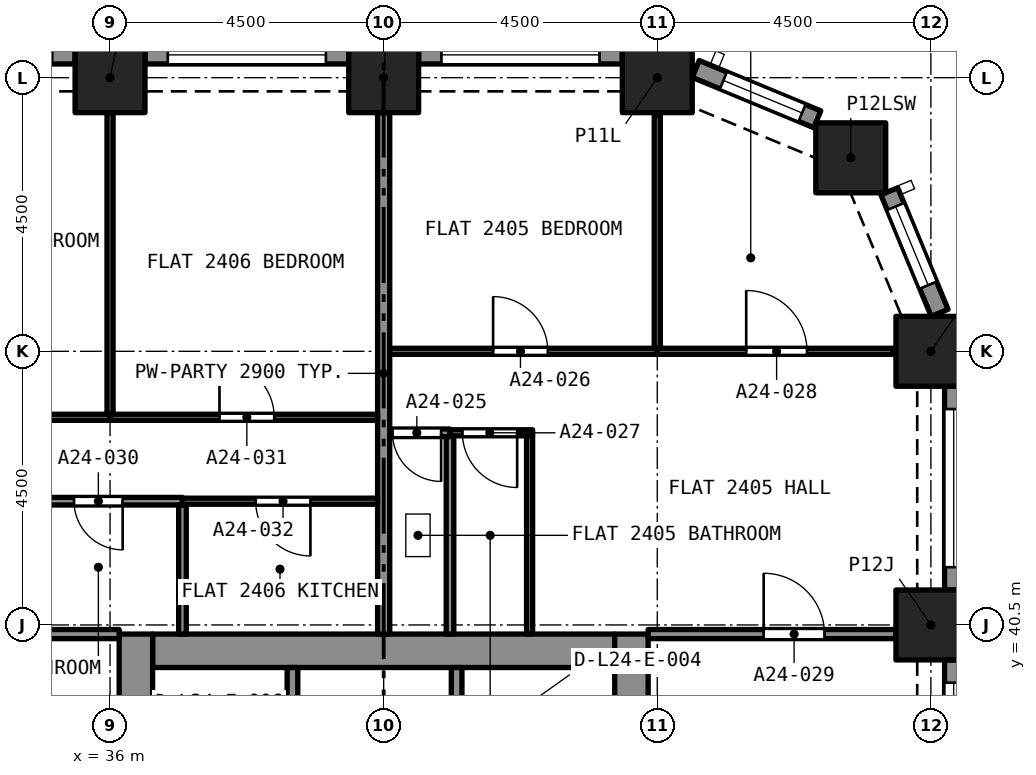
"""IFC4 building model, lengths in metres.
Left out: names, types, materials, properties, quantities, classifications, styles, units other than length and angle.
Written with IfcOpenShell. Run it as: python <this file> out.ifc"""

import sys

from ifc_helpers import new_model, si_unit, direction, frame, frame_2d, origin, origin_2d, place, context, subcontext, project, spatial, rectangle, extrude, element, fill, save


model = new_model("IFC4")
c1 = context("Model", 3, precision=1e-05, world=origin(), true_north=direction((0.0, 1.0)))
c2 = subcontext(c1, "Body", "Model", "MODEL_VIEW")
j1 = project(units=[si_unit("LENGTHUNIT", "METRE"), si_unit("PLANEANGLEUNIT", "RADIAN")], contexts=[c1])
p1 = place(None, origin())
s1 = spatial("IfcSite", under=j1, at=p1, CompositionType="ELEMENT")
p2 = place(p1, origin())
s2 = spatial("IfcBuilding", under=s1, at=p2, CompositionType="ELEMENT")
p3 = place(p2, frame((0.0, 0.0, 89.6)))
s3 = spatial("IfcBuildingStorey", under=s2, at=p3, CompositionType="ELEMENT", Elevation=89.6)
for number, where, z_axis, x_axis in (
    (1, (49.5, 40.5, 0.0), (0.0, 0.0, 1.0), (1.0, 0.0, 0.0)),
    (2, (49.5, 45.0, 0.0), (0.0, 0.0, 1.0), (1.0, 0.0, 0.0)),
    (3, (48.182, 48.182, 0.0), (0.0, 0.0, 1.0), (1.0, 0.0, 0.0)),
    (4, (36.0, 49.5, 0.0), (0.0, 0.0, 1.0), (1.0, 0.0, 0.0)),
    (5, (40.5, 49.5, 0.0), (0.0, 0.0, 1.0), (1.0, 0.0, 0.0)),
    (6, (45.0, 49.5, 0.0), (0.0, 0.0, 1.0), (1.0, 0.0, 0.0)),
):
    element("IfcColumn", number, at=place(p3, frame(where, z_axis=z_axis, x_axis=x_axis)), inside=s3, PredefinedType="COLUMN", context=c2, shape_type="SweptSolid", body=[
        extrude(rectangle(XDim=1.15, YDim=1.15, at=origin_2d()), origin(), (0.0, 0.0, 1.0), 3.2),
    ])
p4 = place(p3, frame((36.7, 40.075, 0.0), z_axis=(0.0, 0.0, 1.0), x_axis=(1.0, 0.0, 0.0)))
e7 = element("IfcWall", 7, at=p4, inside=s3, PredefinedType="SOLIDWALL", context=c2, shape_type="SweptSolid", body=[
    extrude(rectangle(XDim=7.6, YDim=0.55, at=frame_2d((3.8, 0.0))), origin(), (0.0, 0.0, 1.0), 3.2),
])
p5 = place(p3, frame((36.425, 27.15, 0.0), z_axis=(0.0, 0.0, 1.0), x_axis=(0.0, 1.0, 0.0)))
e8 = element("IfcWall", 8, at=p5, inside=s3, PredefinedType="SOLIDWALL", context=c2, shape_type="SweptSolid", body=[
    extrude(rectangle(XDim=13.2, YDim=0.55, at=frame_2d((6.6, 0.0))), origin(), (0.0, 0.0, 1.0), 3.2),
])
p6 = place(p5, frame((8.8, 0.0, 0.0)))
e9 = element("IfcOpeningElement", 9, at=p6, cuts=e8, PredefinedType="OPENING", context=c2, shape_type="SweptSolid", body=[
    extrude(rectangle(XDim=1.2, YDim=2.1, at=frame_2d((0.6, 1.05))), frame((0.0, 0.285, 0.0), z_axis=(0.0, -1.0, 0.0), x_axis=(1.0, 0.0, 0.0)), (0.0, 0.0, 1.0), 0.57),
])
p7 = place(p3, frame((44.575, 27.15, 0.0), z_axis=(0.0, 0.0, 1.0), x_axis=(0.0, 1.0, 0.0)))
e10 = element("IfcWall", 10, at=p7, inside=s3, PredefinedType="SOLIDWALL", context=c2, shape_type="SweptSolid", body=[
    extrude(rectangle(XDim=13.2, YDim=0.55, at=frame_2d((6.6, 0.0))), origin(), (0.0, 0.0, 1.0), 3.2),
])
p8 = place(p7, frame((8.8, 0.0, 0.0)))
e11 = element("IfcOpeningElement", 11, at=p8, cuts=e10, PredefinedType="OPENING", context=c2, shape_type="SweptSolid", body=[
    extrude(rectangle(XDim=1.2, YDim=2.1, at=frame_2d((0.6, 1.05))), frame((0.0, 0.285, 0.0), z_axis=(0.0, -1.0, 0.0), x_axis=(1.0, 0.0, 0.0)), (0.0, 0.0, 1.0), 0.57),
])
p9 = place(p3, frame((49.875, 39.925, 0.0), z_axis=(0.0, 0.0, 1.0), x_axis=(0.0, -1.0, 0.0)))
e12 = element("IfcWall", 12, at=p9, inside=s3, PredefinedType="SOLIDWALL", context=c2, shape_type="SweptSolid", body=[
    extrude(rectangle(XDim=3.35, YDim=0.3, at=frame_2d((1.675, 0.0))), origin(), (0.0, 0.0, 1.0), 3.2),
])
p10 = place(p9, frame((0.375, 0.0, 0.45)))
e13 = element("IfcOpeningElement", 13, at=p10, cuts=e12, PredefinedType="OPENING", context=c2, shape_type="SweptSolid", body=[
    extrude(rectangle(XDim=2.6, YDim=1.95, at=frame_2d((1.3, 0.975))), frame((0.0, 0.16, 0.0), z_axis=(0.0, -1.0, 0.0), x_axis=(1.0, 0.0, 0.0)), (0.0, 0.0, 1.0), 0.32),
])
p11 = place(p3, frame((49.875, 44.425, 0.0), z_axis=(0.0, 0.0, 1.0), x_axis=(0.0, -1.0, 0.0)))
e14 = element("IfcWall", 14, at=p11, inside=s3, PredefinedType="SOLIDWALL", context=c2, shape_type="SweptSolid", body=[
    extrude(rectangle(XDim=3.35, YDim=0.3, at=frame_2d((1.675, 0.0))), origin(), (0.0, 0.0, 1.0), 3.2),
])
p12 = place(p11, frame((0.375, 0.0, 0.45)))
e15 = element("IfcOpeningElement", 15, at=p12, cuts=e14, PredefinedType="OPENING", context=c2, shape_type="SweptSolid", body=[
    extrude(rectangle(XDim=2.6, YDim=1.95, at=frame_2d((1.3, 0.975))), frame((0.0, 0.16, 0.0), z_axis=(0.0, -1.0, 0.0), x_axis=(1.0, 0.0, 0.0)), (0.0, 0.0, 1.0), 0.32),
])
p13 = place(p3, frame((48.816, 47.631, 0.0), z_axis=(0.0, 0.0, 1.0), x_axis=(0.382723818695, -0.923862802911, 0.0)))
e16 = element("IfcWall", 16, at=p13, inside=s3, PredefinedType="SOLIDWALL", context=c2, shape_type="SweptSolid", body=[
    extrude(rectangle(XDim=2.164, YDim=0.3, at=frame_2d((1.082, 0.0))), origin(), (0.0, 0.0, 1.0), 3.2),
])
p14 = place(p13, frame((0.271, 0.0, 0.45)))
e17 = element("IfcOpeningElement", 17, at=p14, cuts=e16, PredefinedType="OPENING", context=c2, shape_type="SweptSolid", body=[
    extrude(rectangle(XDim=1.4, YDim=1.95, at=frame_2d((0.7, 0.975))), frame((0.0, 0.16, 0.0), z_axis=(0.0, -1.0, 0.0), x_axis=(1.0, 0.0, 0.0)), (0.0, 0.0, 1.0), 0.32),
])
p15 = place(p3, frame((45.632, 49.644, 0.0), z_axis=(0.0, 0.0, 1.0), x_axis=(0.923862802911, -0.382723818695, 0.0)))
e18 = element("IfcWall", 18, at=p15, inside=s3, PredefinedType="SOLIDWALL", context=c2, shape_type="SweptSolid", body=[
    extrude(rectangle(XDim=2.164, YDim=0.3, at=frame_2d((1.082, 0.0))), origin(), (0.0, 0.0, 1.0), 3.2),
])
p16 = place(p15, frame((0.493, 0.0, 0.45)))
e19 = element("IfcOpeningElement", 19, at=p16, cuts=e18, PredefinedType="OPENING", context=c2, shape_type="SweptSolid", body=[
    extrude(rectangle(XDim=1.4, YDim=1.95, at=frame_2d((0.7, 0.975))), frame((0.0, 0.16, 0.0), z_axis=(0.0, -1.0, 0.0), x_axis=(1.0, 0.0, 0.0)), (0.0, 0.0, 1.0), 0.32),
])
p17 = place(p3, frame((41.075, 49.875, 0.0), z_axis=(0.0, 0.0, 1.0), x_axis=(1.0, 0.0, 0.0)))
e20 = element("IfcWall", 20, at=p17, inside=s3, PredefinedType="SOLIDWALL", context=c2, shape_type="SweptSolid", body=[
    extrude(rectangle(XDim=3.35, YDim=0.3, at=frame_2d((1.675, 0.0))), origin(), (0.0, 0.0, 1.0), 3.2),
])
p18 = place(p17, frame((0.375, 0.0, 0.45)))
e21 = element("IfcOpeningElement", 21, at=p18, cuts=e20, PredefinedType="OPENING", context=c2, shape_type="SweptSolid", body=[
    extrude(rectangle(XDim=2.6, YDim=1.95, at=frame_2d((1.3, 0.975))), frame((0.0, 0.16, 0.0), z_axis=(0.0, -1.0, 0.0), x_axis=(1.0, 0.0, 0.0)), (0.0, 0.0, 1.0), 0.32),
])
p19 = place(p3, frame((36.575, 49.875, 0.0), z_axis=(0.0, 0.0, 1.0), x_axis=(1.0, 0.0, 0.0)))
e22 = element("IfcWall", 22, at=p19, inside=s3, PredefinedType="SOLIDWALL", context=c2, shape_type="SweptSolid", body=[
    extrude(rectangle(XDim=3.35, YDim=0.3, at=frame_2d((1.675, 0.0))), origin(), (0.0, 0.0, 1.0), 3.2),
])
p20 = place(p19, frame((0.375, 0.0, 0.45)))
e23 = element("IfcOpeningElement", 23, at=p20, cuts=e22, PredefinedType="OPENING", context=c2, shape_type="SweptSolid", body=[
    extrude(rectangle(XDim=2.6, YDim=1.95, at=frame_2d((1.3, 0.975))), frame((0.0, 0.16, 0.0), z_axis=(0.0, -1.0, 0.0), x_axis=(1.0, 0.0, 0.0)), (0.0, 0.0, 1.0), 0.32),
])
p21 = place(p3, frame((32.075, 49.875, 0.0), z_axis=(0.0, 0.0, 1.0), x_axis=(1.0, 0.0, 0.0)))
e24 = element("IfcWall", 24, at=p21, inside=s3, PredefinedType="SOLIDWALL", context=c2, shape_type="SweptSolid", body=[
    extrude(rectangle(XDim=3.35, YDim=0.3, at=frame_2d((1.675, 0.0))), origin(), (0.0, 0.0, 1.0), 3.2),
])
p22 = place(p21, frame((0.375, 0.0, 0.45)))
e25 = element("IfcOpeningElement", 25, at=p22, cuts=e24, PredefinedType="OPENING", context=c2, shape_type="SweptSolid", body=[
    extrude(rectangle(XDim=2.6, YDim=1.95, at=frame_2d((1.3, 0.975))), frame((0.0, 0.16, 0.0), z_axis=(0.0, -1.0, 0.0), x_axis=(1.0, 0.0, 0.0)), (0.0, 0.0, 1.0), 0.32),
])
p23 = place(p3, frame((41.591, 43.66, 0.0), z_axis=(0.0, 0.0, 1.0), x_axis=(-1.0, 0.0, 0.0)))
e26 = element("IfcWall", 26, at=p23, inside=s3, PredefinedType="PARTITIONING", context=c2, shape_type="SweptSolid", body=[
    extrude(rectangle(XDim=0.991, YDim=0.125, at=frame_2d((0.495, 0.0))), origin(), (0.0, 0.0, 1.0), 2.9),
])
p24 = place(p23, frame((0.146, 0.0, 0.0)))
e27 = element("IfcOpeningElement", 27, at=p24, cuts=e26, PredefinedType="OPENING", context=c2, shape_type="SweptSolid", body=[
    extrude(rectangle(XDim=0.8, YDim=2.1, at=frame_2d((0.4, 1.05))), frame((0.0, 0.073, 0.0), z_axis=(0.0, -1.0, 0.0), x_axis=(1.0, 0.0, 0.0)), (0.0, 0.0, 1.0), 0.145),
])
p25 = place(p3, frame((41.591, 40.35, 0.0), z_axis=(0.0, 0.0, 1.0), x_axis=(0.0, 1.0, 0.0)))
e28 = element("IfcWall", 28, at=p25, inside=s3, PredefinedType="PARTITIONING", context=c2, shape_type="SweptSolid", body=[
    extrude(rectangle(XDim=3.247, YDim=0.125, at=frame_2d((1.624, 0.0))), origin(), (0.0, 0.0, 1.0), 2.9),
])
p26 = place(p3, frame((40.5, 40.35, 0.0), z_axis=(0.0, 0.0, 1.0), x_axis=(0.0, 1.0, 0.0)))
e29 = element("IfcWall", 29, at=p26, inside=s3, PredefinedType="PARTITIONING", context=c2, shape_type="SweptSolid", body=[
    extrude(rectangle(XDim=8.575, YDim=0.2, at=frame_2d((4.288, 0.0))), origin(), (0.0, 0.0, 1.0), 2.9),
])
p27 = place(p3, frame((40.6, 45.0, 0.0), z_axis=(0.0, 0.0, 1.0), x_axis=(1.0, 0.0, 0.0)))
e30 = element("IfcWall", 30, at=p27, inside=s3, PredefinedType="PARTITIONING", context=c2, shape_type="SweptSolid", body=[
    extrude(rectangle(XDim=4.4, YDim=0.1, at=frame_2d((2.2, 0.0))), origin(), (0.0, 0.0, 1.0), 2.9),
])
p28 = place(p27, frame((1.7, 0.0, 0.0)))
e31 = element("IfcOpeningElement", 31, at=p28, cuts=e30, PredefinedType="OPENING", context=c2, shape_type="SweptSolid", body=[
    extrude(rectangle(XDim=0.9, YDim=2.1, at=frame_2d((0.45, 1.05))), frame((0.0, 0.06, 0.0), z_axis=(0.0, -1.0, 0.0), x_axis=(1.0, 0.0, 0.0)), (0.0, 0.0, 1.0), 0.12),
])
p29 = place(p3, frame((45.0, 45.05, 0.0), z_axis=(0.0, 0.0, 1.0), x_axis=(0.0, 1.0, 0.0)))
e32 = element("IfcWall", 32, at=p29, inside=s3, PredefinedType="PARTITIONING", context=c2, shape_type="SweptSolid", body=[
    extrude(rectangle(XDim=3.828, YDim=0.1, at=frame_2d((1.914, 0.0))), origin(), (0.0, 0.0, 1.0), 2.9),
])
p30 = place(p3, frame((42.9, 40.35, 0.0), z_axis=(0.0, 0.0, 1.0), x_axis=(0.0, 1.0, 0.0)))
e33 = element("IfcWall", 33, at=p30, inside=s3, PredefinedType="PARTITIONING", context=c2, shape_type="SweptSolid", body=[
    extrude(rectangle(XDim=3.26, YDim=0.1, at=frame_2d((1.63, 0.0))), origin(), (0.0, 0.0, 1.0), 2.9),
])
p31 = place(p3, frame((42.95, 43.66, 0.0), z_axis=(0.0, 0.0, 1.0), x_axis=(-1.0, 0.0, 0.0)))
e34 = element("IfcWall", 34, at=p31, inside=s3, PredefinedType="PARTITIONING", context=c2, shape_type="SweptSolid", body=[
    extrude(rectangle(XDim=1.359, YDim=0.1, at=frame_2d((0.68, 0.0))), origin(), (0.0, 0.0, 1.0), 2.9),
])
p32 = place(p31, frame((0.254, 0.0, 0.0)))
e35 = element("IfcOpeningElement", 35, at=p32, cuts=e34, PredefinedType="OPENING", context=c2, shape_type="SweptSolid", body=[
    extrude(rectangle(XDim=0.9, YDim=2.1, at=frame_2d((0.45, 1.05))), frame((0.0, 0.06, 0.0), z_axis=(0.0, -1.0, 0.0), x_axis=(1.0, 0.0, 0.0)), (0.0, 0.0, 1.0), 0.12),
])
p33 = place(p3, frame((45.0, 45.0, 0.0), z_axis=(0.0, 0.0, 1.0), x_axis=(1.0, 0.0, 0.0)))
e36 = element("IfcWall", 36, at=p33, inside=s3, PredefinedType="PARTITIONING", context=c2, shape_type="SweptSolid", body=[
    extrude(rectangle(XDim=3.878, YDim=0.1, at=frame_2d((1.939, 0.0))), origin(), (0.0, 0.0, 1.0), 2.9),
])
p34 = place(p33, frame((1.462, 0.0, 0.0)))
e37 = element("IfcOpeningElement", 37, at=p34, cuts=e36, PredefinedType="OPENING", context=c2, shape_type="SweptSolid", body=[
    extrude(rectangle(XDim=1.0, YDim=2.1, at=frame_2d((0.5, 1.05))), frame((0.0, 0.06, 0.0), z_axis=(0.0, -1.0, 0.0), x_axis=(1.0, 0.0, 0.0)), (0.0, 0.0, 1.0), 0.12),
])
p35 = place(p3, frame((44.85, 40.35, 0.0), z_axis=(0.0, 0.0, 1.0), x_axis=(1.0, 0.0, 0.0)))
e38 = element("IfcWall", 38, at=p35, inside=s3, PredefinedType="PARTITIONING", context=c2, shape_type="SweptSolid", body=[
    extrude(rectangle(XDim=4.075, YDim=0.15, at=frame_2d((2.038, 0.0))), origin(), (0.0, 0.0, 1.0), 2.9),
])
p36 = place(p35, frame((1.9, 0.0, 0.0)))
e39 = element("IfcOpeningElement", 39, at=p36, cuts=e38, PredefinedType="OPENING", context=c2, shape_type="SweptSolid", body=[
    extrude(rectangle(XDim=1.0, YDim=2.1, at=frame_2d((0.5, 1.05))), frame((0.0, 0.085, 0.0), z_axis=(0.0, -1.0, 0.0), x_axis=(1.0, 0.0, 0.0)), (0.0, 0.0, 1.0), 0.17),
])
p37 = place(p3, frame((37.19, 42.535, 0.0), z_axis=(0.0, 0.0, 1.0), x_axis=(-1.0, 0.0, 0.0)))
e40 = element("IfcWall", 40, at=p37, inside=s3, PredefinedType="PARTITIONING", context=c2, shape_type="SweptSolid", body=[
    extrude(rectangle(XDim=2.828, YDim=0.125, at=frame_2d((1.414, 0.0))), origin(), (0.0, 0.0, 1.0), 2.9),
])
p38 = place(p37, frame((0.983, 0.0, 0.0)))
e41 = element("IfcOpeningElement", 41, at=p38, cuts=e40, PredefinedType="OPENING", context=c2, shape_type="SweptSolid", body=[
    extrude(rectangle(XDim=0.8, YDim=2.1, at=frame_2d((0.4, 1.05))), frame((0.0, 0.073, 0.0), z_axis=(0.0, -1.0, 0.0), x_axis=(1.0, 0.0, 0.0)), (0.0, 0.0, 1.0), 0.145),
])
p39 = place(p3, frame((37.191, 40.35, 0.0), z_axis=(0.0, 0.0, 1.0), x_axis=(0.0, 1.0, 0.0)))
e42 = element("IfcWall", 42, at=p39, inside=s3, PredefinedType="PARTITIONING", context=c2, shape_type="SweptSolid", body=[
    extrude(rectangle(XDim=2.122, YDim=0.125, at=frame_2d((1.061, 0.0))), origin(), (0.0, 0.0, 1.0), 2.9),
])
p40 = place(p3, frame((34.425, 40.35, 0.0), z_axis=(0.0, 0.0, 1.0), x_axis=(1.0, 0.0, 0.0)))
e43 = element("IfcWall", 43, at=p40, inside=s3, PredefinedType="PARTITIONING", context=c2, shape_type="SweptSolid", body=[
    extrude(rectangle(XDim=1.725, YDim=0.15, at=frame_2d((0.862, 0.0))), origin(), (0.0, 0.0, 1.0), 2.9),
])
p41 = place(p3, frame((36.0, 43.915, 0.0), z_axis=(0.0, 0.0, 1.0), x_axis=(1.0, 0.0, 0.0)))
e44 = element("IfcWall", 44, at=p41, inside=s3, PredefinedType="PARTITIONING", context=c2, shape_type="SweptSolid", body=[
    extrude(rectangle(XDim=4.4, YDim=0.1, at=frame_2d((2.2, 0.0))), origin(), (0.0, 0.0, 1.0), 2.9),
])
p42 = place(p41, frame((1.8, 0.0, 0.0)))
e45 = element("IfcOpeningElement", 45, at=p42, cuts=e44, PredefinedType="OPENING", context=c2, shape_type="SweptSolid", body=[
    extrude(rectangle(XDim=0.9, YDim=2.1, at=frame_2d((0.45, 1.05))), frame((0.0, 0.06, 0.0), z_axis=(0.0, -1.0, 0.0), x_axis=(1.0, 0.0, 0.0)), (0.0, 0.0, 1.0), 0.12),
])
p43 = place(p3, frame((36.0, 43.965, 0.0), z_axis=(0.0, 0.0, 1.0), x_axis=(0.0, 1.0, 0.0)))
e46 = element("IfcWall", 46, at=p43, inside=s3, PredefinedType="PARTITIONING", context=c2, shape_type="SweptSolid", body=[
    extrude(rectangle(XDim=4.96, YDim=0.1, at=frame_2d((2.48, 0.0))), origin(), (0.0, 0.0, 1.0), 2.9),
])
p44 = place(p3, frame((40.4, 42.535, 0.0), z_axis=(0.0, 0.0, 1.0), x_axis=(-1.0, 0.0, 0.0)))
e47 = element("IfcWall", 47, at=p44, inside=s3, PredefinedType="PARTITIONING", context=c2, shape_type="SweptSolid", body=[
    extrude(rectangle(XDim=3.209, YDim=0.1, at=frame_2d((1.605, 0.0))), origin(), (0.0, 0.0, 1.0), 2.9),
])
p45 = place(p44, frame((1.105, 0.0, 0.0)))
e48 = element("IfcOpeningElement", 48, at=p45, cuts=e47, PredefinedType="OPENING", context=c2, shape_type="SweptSolid", body=[
    extrude(rectangle(XDim=0.9, YDim=2.1, at=frame_2d((0.45, 1.05))), frame((0.0, 0.06, 0.0), z_axis=(0.0, -1.0, 0.0), x_axis=(1.0, 0.0, 0.0)), (0.0, 0.0, 1.0), 0.12),
])
p46 = place(p3, frame((31.6, 43.915, 0.0), z_axis=(0.0, 0.0, 1.0), x_axis=(1.0, 0.0, 0.0)))
e49 = element("IfcWall", 49, at=p46, inside=s3, PredefinedType="PARTITIONING", context=c2, shape_type="SweptSolid", body=[
    extrude(rectangle(XDim=4.4, YDim=0.1, at=frame_2d((2.2, 0.0))), origin(), (0.0, 0.0, 1.0), 2.9),
])
p47 = place(p46, frame((1.65, 0.0, 0.0)))
e50 = element("IfcOpeningElement", 50, at=p47, cuts=e49, PredefinedType="OPENING", context=c2, shape_type="SweptSolid", body=[
    extrude(rectangle(XDim=1.0, YDim=2.1, at=frame_2d((0.5, 1.05))), frame((0.0, 0.06, 0.0), z_axis=(0.0, -1.0, 0.0), x_axis=(1.0, 0.0, 0.0)), (0.0, 0.0, 1.0), 0.12),
])
for number, where, z_axis, x_axis in (
    (51, (41.7, 37.5, 0.0), (0.0, 0.0, 1.0), (0.0, 1.0, 0.0)),
    (52, (39.0, 37.5, 0.0), (0.0, 0.0, 1.0), (0.0, 1.0, 0.0)),
):
    element("IfcWall", number, at=place(p3, frame(where, z_axis=z_axis, x_axis=x_axis)), inside=s3, PredefinedType="SOLIDWALL", context=c2, shape_type="SweptSolid", body=[
        extrude(rectangle(XDim=2.3, YDim=0.175, at=frame_2d((1.15, 0.0))), origin(), (0.0, 0.0, 1.0), 2.9),
    ])
p48 = place(p10, origin())
e53 = element("IfcWindow", 53, at=p48, inside=s3, PartitioningType="SINGLE_PANEL", PredefinedType="WINDOW", context=c2, shape_type="SweptSolid", body=[
    extrude(rectangle(XDim=2.6, YDim=1.95, at=frame_2d((1.3, 0.975))), frame((0.0, 0.03, 0.0), z_axis=(0.0, -1.0, 0.0), x_axis=(1.0, 0.0, 0.0)), (0.0, 0.0, 1.0), 0.06),
])
fill(e13, e53)
p49 = place(p12, origin())
e54 = element("IfcWindow", 54, at=p49, inside=s3, PartitioningType="SINGLE_PANEL", PredefinedType="WINDOW", context=c2, shape_type="SweptSolid", body=[
    extrude(rectangle(XDim=2.6, YDim=1.95, at=frame_2d((1.3, 0.975))), frame((0.0, 0.03, 0.0), z_axis=(0.0, -1.0, 0.0), x_axis=(1.0, 0.0, 0.0)), (0.0, 0.0, 1.0), 0.06),
])
fill(e15, e54)
p50 = place(p14, origin())
e55 = element("IfcWindow", 55, at=p50, inside=s3, PartitioningType="SINGLE_PANEL", PredefinedType="WINDOW", context=c2, shape_type="SweptSolid", body=[
    extrude(rectangle(XDim=1.4, YDim=1.95, at=frame_2d((0.7, 0.975))), frame((0.0, 0.03, 0.0), z_axis=(0.0, -1.0, 0.0), x_axis=(1.0, 0.0, 0.0)), (0.0, 0.0, 1.0), 0.06),
])
fill(e17, e55)
p51 = place(p16, origin())
e56 = element("IfcWindow", 56, at=p51, inside=s3, PartitioningType="SINGLE_PANEL", PredefinedType="WINDOW", context=c2, shape_type="SweptSolid", body=[
    extrude(rectangle(XDim=1.4, YDim=1.95, at=frame_2d((0.7, 0.975))), frame((0.0, 0.03, 0.0), z_axis=(0.0, -1.0, 0.0), x_axis=(1.0, 0.0, 0.0)), (0.0, 0.0, 1.0), 0.06),
])
fill(e19, e56)
p52 = place(p18, origin())
e57 = element("IfcWindow", 57, at=p52, inside=s3, PartitioningType="SINGLE_PANEL", PredefinedType="WINDOW", context=c2, shape_type="SweptSolid", body=[
    extrude(rectangle(XDim=2.6, YDim=1.95, at=frame_2d((1.3, 0.975))), frame((0.0, 0.03, 0.0), z_axis=(0.0, -1.0, 0.0), x_axis=(1.0, 0.0, 0.0)), (0.0, 0.0, 1.0), 0.06),
])
fill(e21, e57)
p53 = place(p20, origin())
e58 = element("IfcWindow", 58, at=p53, inside=s3, PartitioningType="SINGLE_PANEL", PredefinedType="WINDOW", context=c2, shape_type="SweptSolid", body=[
    extrude(rectangle(XDim=2.6, YDim=1.95, at=frame_2d((1.3, 0.975))), frame((0.0, 0.03, 0.0), z_axis=(0.0, -1.0, 0.0), x_axis=(1.0, 0.0, 0.0)), (0.0, 0.0, 1.0), 0.06),
])
fill(e23, e58)
p54 = place(p24, origin())
e59 = element("IfcDoor", 59, at=p54, inside=s3, OperationType="SINGLE_SWING_RIGHT", PredefinedType="DOOR", context=c2, shape_type="SweptSolid", body=[
    extrude(rectangle(XDim=0.8, YDim=2.1, at=frame_2d((0.4, 1.05))), frame((0.0, 0.025, 0.0), z_axis=(0.0, -1.0, 0.0), x_axis=(1.0, 0.0, 0.0)), (0.0, 0.0, 1.0), 0.05),
])
fill(e27, e59)
p55 = place(p28, origin())
e60 = element("IfcDoor", 60, at=p55, inside=s3, OperationType="SINGLE_SWING_LEFT", PredefinedType="DOOR", context=c2, shape_type="SweptSolid", body=[
    extrude(rectangle(XDim=0.9, YDim=2.1, at=frame_2d((0.45, 1.05))), frame((0.0, 0.025, 0.0), z_axis=(0.0, -1.0, 0.0), x_axis=(1.0, 0.0, 0.0)), (0.0, 0.0, 1.0), 0.05),
])
fill(e31, e60)
p56 = place(p32, origin())
e61 = element("IfcDoor", 61, at=p56, inside=s3, OperationType="SINGLE_SWING_RIGHT", PredefinedType="DOOR", context=c2, shape_type="SweptSolid", body=[
    extrude(rectangle(XDim=0.9, YDim=2.1, at=frame_2d((0.45, 1.05))), frame((0.0, 0.025, 0.0), z_axis=(0.0, -1.0, 0.0), x_axis=(1.0, 0.0, 0.0)), (0.0, 0.0, 1.0), 0.05),
])
fill(e35, e61)
p57 = place(p34, origin())
e62 = element("IfcDoor", 62, at=p57, inside=s3, OperationType="SINGLE_SWING_RIGHT", PredefinedType="DOOR", context=c2, shape_type="SweptSolid", body=[
    extrude(rectangle(XDim=1.0, YDim=2.1, at=frame_2d((0.5, 1.05))), frame((0.0, 0.025, 0.0), z_axis=(0.0, -1.0, 0.0), x_axis=(1.0, 0.0, 0.0)), (0.0, 0.0, 1.0), 0.05),
])
fill(e37, e62)
p58 = place(p36, origin())
e63 = element("IfcDoor", 63, at=p58, inside=s3, OperationType="SINGLE_SWING_RIGHT", PredefinedType="DOOR", context=c2, shape_type="SweptSolid", body=[
    extrude(rectangle(XDim=1.0, YDim=2.1, at=frame_2d((0.5, 1.05))), frame((0.0, 0.025, 0.0), z_axis=(0.0, -1.0, 0.0), x_axis=(1.0, 0.0, 0.0)), (0.0, 0.0, 1.0), 0.05),
])
fill(e39, e63)
p59 = place(p38, origin())
e64 = element("IfcDoor", 64, at=p59, inside=s3, OperationType="SINGLE_SWING_LEFT", PredefinedType="DOOR", context=c2, shape_type="SweptSolid", body=[
    extrude(rectangle(XDim=0.8, YDim=2.1, at=frame_2d((0.4, 1.05))), frame((0.0, 0.025, 0.0), z_axis=(0.0, -1.0, 0.0), x_axis=(1.0, 0.0, 0.0)), (0.0, 0.0, 1.0), 0.05),
])
fill(e41, e64)
p60 = place(p42, origin())
e65 = element("IfcDoor", 65, at=p60, inside=s3, OperationType="SINGLE_SWING_RIGHT", PredefinedType="DOOR", context=c2, shape_type="SweptSolid", body=[
    extrude(rectangle(XDim=0.9, YDim=2.1, at=frame_2d((0.45, 1.05))), frame((0.0, 0.025, 0.0), z_axis=(0.0, -1.0, 0.0), x_axis=(1.0, 0.0, 0.0)), (0.0, 0.0, 1.0), 0.05),
])
fill(e45, e65)
p61 = place(p45, origin())
e66 = element("IfcDoor", 66, at=p61, inside=s3, OperationType="SINGLE_SWING_LEFT", PredefinedType="DOOR", context=c2, shape_type="SweptSolid", body=[
    extrude(rectangle(XDim=0.9, YDim=2.1, at=frame_2d((0.45, 1.05))), frame((0.0, 0.025, 0.0), z_axis=(0.0, -1.0, 0.0), x_axis=(1.0, 0.0, 0.0)), (0.0, 0.0, 1.0), 0.05),
])
fill(e48, e66)
save(model, sys.argv[1])
